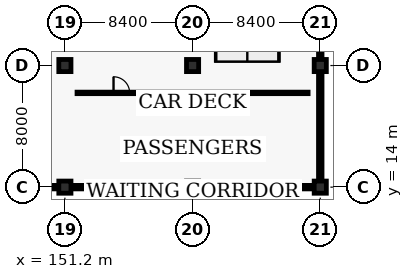
"""IFC4 building model, lengths in metres.
Left out: names, types, materials, properties, quantities, classifications, styles, units other than length and angle.
Written with IfcOpenShell. Run it as: python <this file> out.ifc"""

import sys

from ifc_helpers import new_model, si_unit, direction, frame, frame_2d, origin, origin_2d, place, context, subcontext, project, spatial, rectangle, extrude, element, fill, save


model = new_model("IFC4")
c1 = context("Model", 3, precision=1e-05, world=origin(), true_north=direction((0.0, 1.0)))
c2 = subcontext(c1, "Body", "Model", "MODEL_VIEW")
j1 = project(units=[si_unit("LENGTHUNIT", "METRE"), si_unit("PLANEANGLEUNIT", "RADIAN")], contexts=[c1])
p1 = place(None, origin())
s1 = spatial("IfcSite", under=j1, at=p1, CompositionType="ELEMENT")
p2 = place(p1, origin())
s2 = spatial("IfcBuilding", under=s1, at=p2, CompositionType="ELEMENT")
p3 = place(p2, frame((0.0, 0.0, 5.44)))
s3 = spatial("IfcBuildingStorey", under=s2, at=p3, CompositionType="ELEMENT", Elevation=5.44)
for number, where, z_axis, x_axis in (
    (1, (151.2, 14.0, 0.0), (0.0, 0.0, 1.0), (1.0, 0.0, 0.0)),
    (2, (151.2, 22.0, 0.0), (0.0, 0.0, 1.0), (1.0, 0.0, 0.0)),
    (3, (159.6, 14.0, 0.0), (0.0, 0.0, 1.0), (1.0, 0.0, 0.0)),
    (4, (159.6, 22.0, 0.0), (0.0, 0.0, 1.0), (1.0, 0.0, 0.0)),
    (5, (168.0, 14.0, 0.0), (0.0, 0.0, 1.0), (1.0, 0.0, 0.0)),
    (6, (168.0, 22.0, 0.0), (0.0, 0.0, 1.0), (1.0, 0.0, 0.0)),
):
    element("IfcColumn", number, at=place(p3, frame(where, z_axis=z_axis, x_axis=x_axis)), inside=s3, PredefinedType="COLUMN", context=c2, shape_type="SweptSolid", body=[
        extrude(rectangle(XDim=0.8, YDim=0.8, at=origin_2d()), origin(), (0.0, 0.0, 1.0), 4.16),
    ])
p4 = place(p3, frame((143.2, 14.0, 0.0), z_axis=(0.0, 0.0, 1.0), x_axis=(1.0, 0.0, 0.0)))
e7 = element("IfcWall", 7, at=p4, inside=s3, PredefinedType="PARAPET", context=c2, shape_type="SweptSolid", body=[
    extrude(rectangle(XDim=7.6, YDim=0.23, at=frame_2d((3.8, 0.0))), origin(), (0.0, 0.0, 1.0), 1.15),
])
p5 = place(p3, frame((151.6, 14.0, 0.0), z_axis=(0.0, 0.0, 1.0), x_axis=(1.0, 0.0, 0.0)))
e8 = element("IfcWall", 8, at=p5, inside=s3, PredefinedType="PARAPET", context=c2, shape_type="SweptSolid", body=[
    extrude(rectangle(XDim=7.6, YDim=0.23, at=frame_2d((3.8, 0.0))), origin(), (0.0, 0.0, 1.0), 1.15),
])
p6 = place(p3, frame((160.0, 14.0, 0.0), z_axis=(0.0, 0.0, 1.0), x_axis=(1.0, 0.0, 0.0)))
e9 = element("IfcWall", 9, at=p6, inside=s3, PredefinedType="PARAPET", context=c2, shape_type="SweptSolid", body=[
    extrude(rectangle(XDim=7.6, YDim=0.23, at=frame_2d((3.8, 0.0))), origin(), (0.0, 0.0, 1.0), 1.15),
])
p7 = place(p3, frame((168.0, 14.4, 0.0), z_axis=(0.0, 0.0, 1.0), x_axis=(0.0, 1.0, 0.0)))
e10 = element("IfcWall", 10, at=p7, inside=s3, PredefinedType="PARAPET", context=c2, shape_type="SweptSolid", body=[
    extrude(rectangle(XDim=7.2, YDim=0.23, at=frame_2d((3.6, 0.0))), origin(), (0.0, 0.0, 1.0), 1.15),
])
p8 = place(p3, frame((168.0, 22.4, 0.0), z_axis=(0.0, 0.0, 1.0), x_axis=(0.0, 1.0, 0.0)))
e11 = element("IfcWall", 11, at=p8, inside=s3, PredefinedType="PARAPET", context=c2, shape_type="SweptSolid", body=[
    extrude(rectangle(XDim=7.6, YDim=0.23, at=frame_2d((3.8, 0.0))), origin(), (0.0, 0.0, 1.0), 1.15),
])
p9 = place(p3, frame((152.0, 20.2, 0.0), z_axis=(0.0, 0.0, 1.0), x_axis=(1.0, 0.0, 0.0)))
e12 = element("IfcWall", 12, at=p9, inside=s3, PredefinedType="PARTITIONING", context=c2, shape_type="SweptSolid", body=[
    extrude(rectangle(XDim=15.2, YDim=0.1, at=frame_2d((7.6, 0.0))), origin(), (0.0, 0.0, 1.0), 2.9),
])
p10 = place(p9, frame((2.4, 0.0, 0.0)))
e13 = element("IfcOpeningElement", 13, at=p10, cuts=e12, PredefinedType="OPENING", context=c2, shape_type="SweptSolid", body=[
    extrude(rectangle(XDim=1.06, YDim=2.1, at=frame_2d((0.53, 1.05))), frame((0.0, 0.06, 0.0), z_axis=(0.0, -1.0, 0.0), x_axis=(1.0, 0.0, 0.0)), (0.0, 0.0, 1.0), 0.12),
])
p11 = place(p10, origin())
e14 = element("IfcDoor", 14, at=p11, inside=s3, OperationType="SINGLE_SWING_LEFT", PredefinedType="DOOR", context=c2, shape_type="SweptSolid", body=[
    extrude(rectangle(XDim=1.06, YDim=2.1, at=frame_2d((0.53, 1.05))), frame((0.0, 0.025, 0.0), z_axis=(0.0, -1.0, 0.0), x_axis=(1.0, 0.0, 0.0)), (0.0, 0.0, 1.0), 0.05),
])
fill(e13, e14)
save(model, sys.argv[1])
